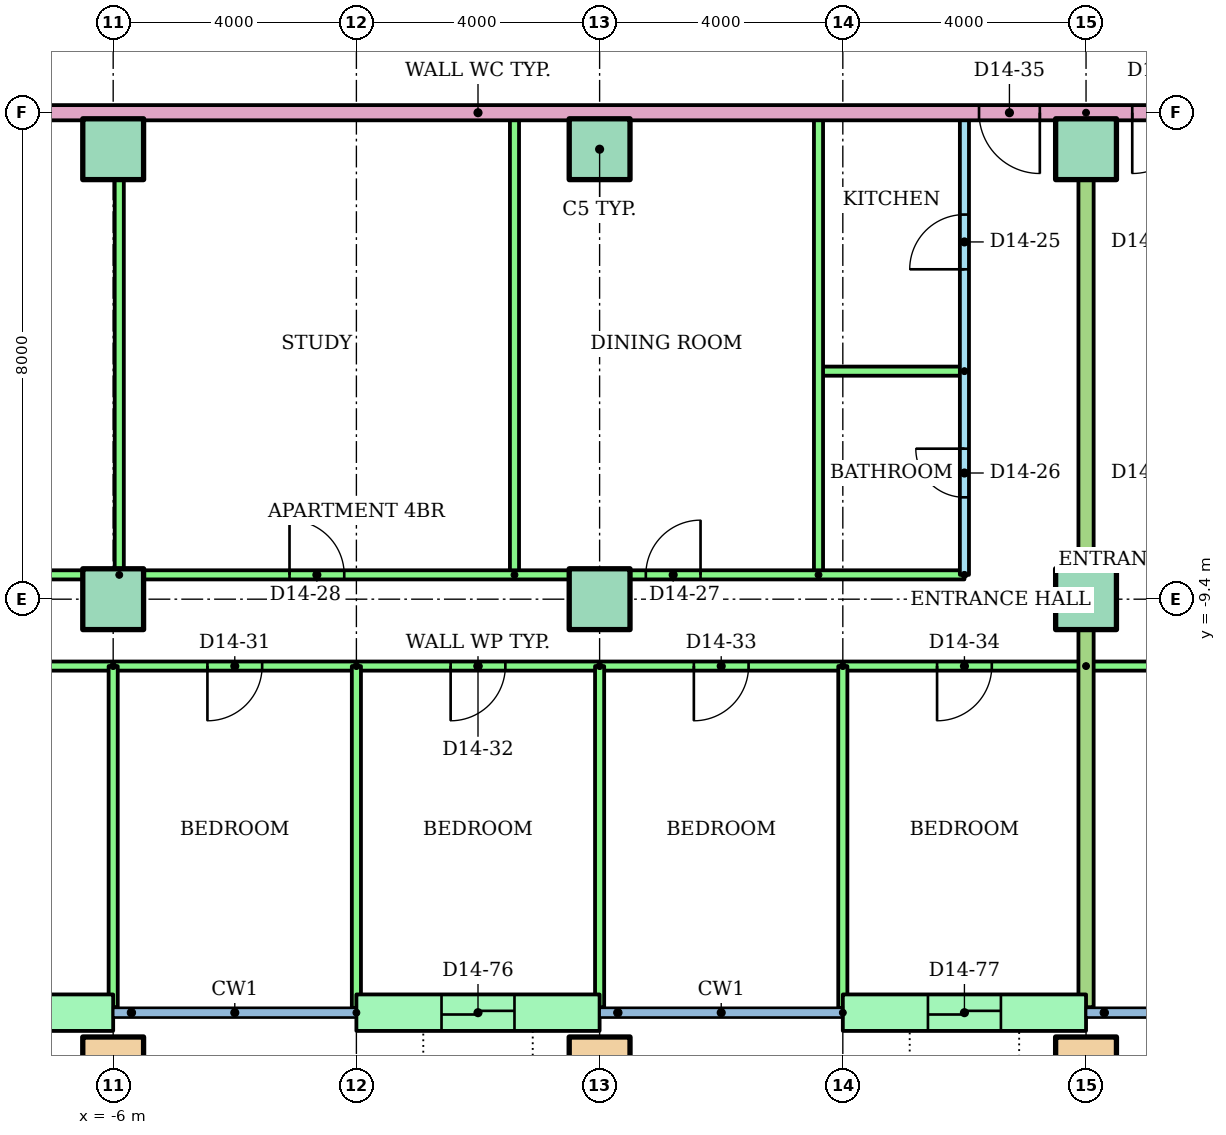
"""IFC4 building model, lengths in metres.
Left out: names, types, materials, properties, quantities, classifications, styles, units other than length and angle.
Written with IfcOpenShell. Run it as: python <this file> out.ifc"""

import sys

from ifc_helpers import new_model, si_unit, direction, frame, frame_2d, origin, origin_2d, place, context, subcontext, project, spatial, rectangle, hollow_rectangle, extrude, element, fill, save


model = new_model("IFC4")
c1 = context("Model", 3, precision=1e-05, world=origin(), true_north=direction((0.0, 1.0)))
c2 = subcontext(c1, "Body", "Model", "MODEL_VIEW")
j1 = project(units=[si_unit("LENGTHUNIT", "METRE"), si_unit("PLANEANGLEUNIT", "RADIAN")], contexts=[c1])
p1 = place(None, origin())
s1 = spatial("IfcSite", under=j1, at=p1, CompositionType="ELEMENT")
p2 = place(p1, origin())
s2 = spatial("IfcBuilding", under=s1, at=p2, CompositionType="ELEMENT")
p3 = place(p2, frame((0.0, 0.0, 54.4)))
s3 = spatial("IfcBuildingStorey", under=s2, at=p3, CompositionType="ELEMENT", Elevation=54.4)
for number, where in (
    (1, (-6.0, -17.1, 0.0)),
    (2, (2.0, -17.1, 0.0)),
    (3, (10.0, -17.1, 0.0)),
):
    element("IfcColumn", number, at=place(p3, frame(where)), inside=s3, PredefinedType="COLUMN", context=c2, shape_type="SweptSolid", body=[
        extrude(hollow_rectangle(XDim=1.0, YDim=1.0, WallThickness=0.05, at=origin_2d()), origin(), (0.0, 0.0, 1.0), 3.2),
    ])
for number, where in (
    (4, (-6.0, -9.4, 0.0)),
    (5, (2.0, -9.4, 0.0)),
    (6, (10.0, -9.4, 0.0)),
    (7, (-6.0, -2.0, 0.0)),
    (8, (2.0, -2.0, 0.0)),
    (9, (10.0, -2.0, 0.0)),
):
    element("IfcColumn", number, at=place(p3, frame(where)), inside=s3, PredefinedType="COLUMN", context=c2, shape_type="SweptSolid", body=[
        extrude(rectangle(XDim=1.0, YDim=1.0, at=origin_2d()), origin(), (0.0, 0.0, 1.0), 3.2),
    ])
p4 = place(p3, frame((-10.0, -16.2, 0.0)))
e10 = element("IfcWall", 10, at=p4, inside=s3, PredefinedType="STANDARD", context=c2, shape_type="SweptSolid", body=[
    extrude(rectangle(XDim=4.0, YDim=0.6, at=frame_2d((2.0, 0.0))), origin(), (0.0, 0.0, 1.0), 2.92),
])
p5 = place(p4, frame((1.4, 0.0, 0.0)))
e11 = element("IfcOpeningElement", 11, at=p5, cuts=e10, PredefinedType="OPENING", context=c2, shape_type="SweptSolid", body=[
    extrude(rectangle(XDim=1.2, YDim=2.1, at=frame_2d((0.6, 1.05))), frame((0.0, 0.31, 0.0), z_axis=(0.0, -1.0, 0.0), x_axis=(1.0, 0.0, 0.0)), (0.0, 0.0, 1.0), 0.62),
])
p6 = place(p3, frame((-2.0, -16.2, 0.0)))
e12 = element("IfcWall", 12, at=p6, inside=s3, PredefinedType="STANDARD", context=c2, shape_type="SweptSolid", body=[
    extrude(rectangle(XDim=4.0, YDim=0.6, at=frame_2d((2.0, 0.0))), origin(), (0.0, 0.0, 1.0), 2.92),
])
p7 = place(p6, frame((1.4, 0.0, 0.0)))
e13 = element("IfcOpeningElement", 13, at=p7, cuts=e12, PredefinedType="OPENING", context=c2, shape_type="SweptSolid", body=[
    extrude(rectangle(XDim=1.2, YDim=2.1, at=frame_2d((0.6, 1.05))), frame((0.0, 0.31, 0.0), z_axis=(0.0, -1.0, 0.0), x_axis=(1.0, 0.0, 0.0)), (0.0, 0.0, 1.0), 0.62),
])
p8 = place(p3, frame((6.0, -16.2, 0.0)))
e14 = element("IfcWall", 14, at=p8, inside=s3, PredefinedType="STANDARD", context=c2, shape_type="SweptSolid", body=[
    extrude(rectangle(XDim=4.0, YDim=0.6, at=frame_2d((2.0, 0.0))), origin(), (0.0, 0.0, 1.0), 2.92),
])
p9 = place(p8, frame((1.4, 0.0, 0.0)))
e15 = element("IfcOpeningElement", 15, at=p9, cuts=e14, PredefinedType="OPENING", context=c2, shape_type="SweptSolid", body=[
    extrude(rectangle(XDim=1.2, YDim=2.1, at=frame_2d((0.6, 1.05))), frame((0.0, 0.31, 0.0), z_axis=(0.0, -1.0, 0.0), x_axis=(1.0, 0.0, 0.0)), (0.0, 0.0, 1.0), 0.62),
])
p10 = place(p3, frame((8.0, -9.0, 0.0), z_axis=(0.0, 0.0, 1.0), x_axis=(0.0, 1.0, 0.0)))
e16 = element("IfcWall", 16, at=p10, inside=s3, PredefinedType="PARTITIONING", context=c2, shape_type="SweptSolid", body=[
    extrude(rectangle(XDim=7.6, YDim=0.15, at=frame_2d((3.8, 0.0))), origin(), (0.0, 0.0, 1.0), 2.4),
])
p11 = place(p10, frame((5.025, 0.0, 0.0)))
e17 = element("IfcOpeningElement", 17, at=p11, cuts=e16, PredefinedType="OPENING", context=c2, shape_type="SweptSolid", body=[
    extrude(rectangle(XDim=0.9, YDim=2.1, at=frame_2d((0.45, 1.05))), frame((0.0, 0.085, 0.0), z_axis=(0.0, -1.0, 0.0), x_axis=(1.0, 0.0, 0.0)), (0.0, 0.0, 1.0), 0.17),
])
p12 = place(p10, frame((1.275, 0.0, 0.0)))
e18 = element("IfcOpeningElement", 18, at=p12, cuts=e16, PredefinedType="OPENING", context=c2, shape_type="SweptSolid", body=[
    extrude(rectangle(XDim=0.8, YDim=2.1, at=frame_2d((0.4, 1.05))), frame((0.0, 0.085, 0.0), z_axis=(0.0, -1.0, 0.0), x_axis=(1.0, 0.0, 0.0)), (0.0, 0.0, 1.0), 0.17),
])
p13 = place(p3, frame((8.0, -5.65, 0.0), z_axis=(0.0, 0.0, 1.0), x_axis=(-1.0, 0.0, 0.0)))
e19 = element("IfcWall", 19, at=p13, inside=s3, PredefinedType="PARTITIONING", context=c2, shape_type="SweptSolid", body=[
    extrude(rectangle(XDim=2.4, YDim=0.15, at=frame_2d((1.2, 0.0))), origin(), (0.0, 0.0, 1.0), 2.4),
])
for number, where, z_axis, x_axis in (
    (20, (5.6, -9.0, 0.0), (0.0, 0.0, 1.0), (0.0, 1.0, 0.0)),
    (21, (0.6, -9.0, 0.0), (0.0, 0.0, 1.0), (0.0, 1.0, 0.0)),
    (22, (-5.9, -9.0, 0.0), (0.0, 0.0, 1.0), (0.0, 1.0, 0.0)),
):
    element("IfcWall", number, at=place(p3, frame(where, z_axis=z_axis, x_axis=x_axis)), inside=s3, PredefinedType="PARTITIONING", context=c2, shape_type="SweptSolid", body=[
        extrude(rectangle(XDim=7.6, YDim=0.15, at=frame_2d((3.8, 0.0))), origin(), (0.0, 0.0, 1.0), 2.4),
    ])
p14 = place(p3, frame((-14.0, -9.0, 0.0)))
e23 = element("IfcWall", 23, at=p14, inside=s3, PredefinedType="PARTITIONING", context=c2, shape_type="SweptSolid", body=[
    extrude(rectangle(XDim=22.0, YDim=0.15, at=frame_2d((11.0, 0.0))), origin(), (0.0, 0.0, 1.0), 2.4),
])
p15 = place(p14, frame((16.76, 0.0, 0.0)))
e24 = element("IfcOpeningElement", 24, at=p15, cuts=e23, PredefinedType="OPENING", context=c2, shape_type="SweptSolid", body=[
    extrude(rectangle(XDim=0.9, YDim=2.1, at=frame_2d((0.45, 1.05))), frame((0.0, 0.085, 0.0), z_axis=(0.0, -1.0, 0.0), x_axis=(1.0, 0.0, 0.0)), (0.0, 0.0, 1.0), 0.17),
])
p16 = place(p14, frame((10.9, 0.0, 0.0)))
e25 = element("IfcOpeningElement", 25, at=p16, cuts=e23, PredefinedType="OPENING", context=c2, shape_type="SweptSolid", body=[
    extrude(rectangle(XDim=0.9, YDim=2.1, at=frame_2d((0.45, 1.05))), frame((0.0, 0.085, 0.0), z_axis=(0.0, -1.0, 0.0), x_axis=(1.0, 0.0, 0.0)), (0.0, 0.0, 1.0), 0.17),
])
p17 = place(p14, frame((3.6, 0.0, 0.0)))
e26 = element("IfcOpeningElement", 26, at=p17, cuts=e23, PredefinedType="OPENING", context=c2, shape_type="SweptSolid", body=[
    extrude(rectangle(XDim=0.9, YDim=2.1, at=frame_2d((0.45, 1.05))), frame((0.0, 0.085, 0.0), z_axis=(0.0, -1.0, 0.0), x_axis=(1.0, 0.0, 0.0)), (0.0, 0.0, 1.0), 0.17),
])
p18 = place(p3, frame((10.0, -10.5, 0.0), z_axis=(0.0, 0.0, 1.0), x_axis=(-1.0, 0.0, 0.0)))
e27 = element("IfcWall", 27, at=p18, inside=s3, PredefinedType="PARTITIONING", context=c2, shape_type="SweptSolid", body=[
    extrude(rectangle(XDim=24.0, YDim=0.15, at=frame_2d((12.0, 0.0))), origin(), (0.0, 0.0, 1.0), 2.4),
])
p19 = place(p18, frame((19.5, 0.0, 0.0)))
e28 = element("IfcOpeningElement", 28, at=p19, cuts=e27, PredefinedType="OPENING", context=c2, shape_type="SweptSolid", body=[
    extrude(rectangle(XDim=1.0, YDim=2.1, at=frame_2d((0.5, 1.05))), frame((0.0, 0.085, 0.0), z_axis=(0.0, -1.0, 0.0), x_axis=(1.0, 0.0, 0.0)), (0.0, 0.0, 1.0), 0.17),
])
p20 = place(p18, frame((13.55, 0.0, 0.0)))
e29 = element("IfcOpeningElement", 29, at=p20, cuts=e27, PredefinedType="OPENING", context=c2, shape_type="SweptSolid", body=[
    extrude(rectangle(XDim=0.9, YDim=2.1, at=frame_2d((0.45, 1.05))), frame((0.0, 0.085, 0.0), z_axis=(0.0, -1.0, 0.0), x_axis=(1.0, 0.0, 0.0)), (0.0, 0.0, 1.0), 0.17),
])
p21 = place(p18, frame((9.55, 0.0, 0.0)))
e30 = element("IfcOpeningElement", 30, at=p21, cuts=e27, PredefinedType="OPENING", context=c2, shape_type="SweptSolid", body=[
    extrude(rectangle(XDim=0.9, YDim=2.1, at=frame_2d((0.45, 1.05))), frame((0.0, 0.085, 0.0), z_axis=(0.0, -1.0, 0.0), x_axis=(1.0, 0.0, 0.0)), (0.0, 0.0, 1.0), 0.17),
])
p22 = place(p18, frame((5.55, 0.0, 0.0)))
e31 = element("IfcOpeningElement", 31, at=p22, cuts=e27, PredefinedType="OPENING", context=c2, shape_type="SweptSolid", body=[
    extrude(rectangle(XDim=0.9, YDim=2.1, at=frame_2d((0.45, 1.05))), frame((0.0, 0.085, 0.0), z_axis=(0.0, -1.0, 0.0), x_axis=(1.0, 0.0, 0.0)), (0.0, 0.0, 1.0), 0.17),
])
p23 = place(p18, frame((1.55, 0.0, 0.0)))
e32 = element("IfcOpeningElement", 32, at=p23, cuts=e27, PredefinedType="OPENING", context=c2, shape_type="SweptSolid", body=[
    extrude(rectangle(XDim=0.9, YDim=2.1, at=frame_2d((0.45, 1.05))), frame((0.0, 0.085, 0.0), z_axis=(0.0, -1.0, 0.0), x_axis=(1.0, 0.0, 0.0)), (0.0, 0.0, 1.0), 0.17),
])
p24 = place(p3, frame((-6.0, -10.5, 0.0), z_axis=(0.0, 0.0, 1.0), x_axis=(0.0, -1.0, 0.0)))
e33 = element("IfcWall", 33, at=p24, inside=s3, PredefinedType="PARTITIONING", context=c2, shape_type="SweptSolid", body=[
    extrude(rectangle(XDim=5.61, YDim=0.15, at=frame_2d((2.805, 0.0))), origin(), (0.0, 0.0, 1.0), 2.4),
])
p25 = place(p3, frame((-2.0, -10.5, 0.0), z_axis=(0.0, 0.0, 1.0), x_axis=(0.0, -1.0, 0.0)))
e34 = element("IfcWall", 34, at=p25, inside=s3, PredefinedType="PARTITIONING", context=c2, shape_type="SweptSolid", body=[
    extrude(rectangle(XDim=5.621, YDim=0.15, at=frame_2d((2.811, 0.0))), origin(), (0.0, 0.0, 1.0), 2.4),
])
p26 = place(p3, frame((2.0, -10.5, 0.0), z_axis=(0.0, 0.0, 1.0), x_axis=(0.0, -1.0, 0.0)))
e35 = element("IfcWall", 35, at=p26, inside=s3, PredefinedType="PARTITIONING", context=c2, shape_type="SweptSolid", body=[
    extrude(rectangle(XDim=5.61, YDim=0.15, at=frame_2d((2.805, 0.0))), origin(), (0.0, 0.0, 1.0), 2.4),
])
p27 = place(p3, frame((6.0, -10.5, 0.0), z_axis=(0.0, 0.0, 1.0), x_axis=(0.0, -1.0, 0.0)))
e36 = element("IfcWall", 36, at=p27, inside=s3, PredefinedType="PARTITIONING", context=c2, shape_type="SweptSolid", body=[
    extrude(rectangle(XDim=5.621, YDim=0.15, at=frame_2d((2.811, 0.0))), origin(), (0.0, 0.0, 1.0), 2.4),
])
p28 = place(p3, frame((36.52, -10.5, 0.0), z_axis=(0.0, 0.0, 1.0), x_axis=(-1.0, 0.0, 0.0)))
e37 = element("IfcWall", 37, at=p28, inside=s3, PredefinedType="PARTITIONING", context=c2, shape_type="SweptSolid", body=[
    extrude(rectangle(XDim=26.52, YDim=0.15, at=frame_2d((13.26, 0.0))), origin(), (0.0, 0.0, 1.0), 2.4),
])
p29 = place(p28, frame((22.02, 0.0, 0.0)))
e38 = element("IfcOpeningElement", 38, at=p29, cuts=e37, PredefinedType="OPENING", context=c2, shape_type="SweptSolid", body=[
    extrude(rectangle(XDim=1.0, YDim=2.1, at=frame_2d((0.5, 1.05))), frame((0.0, 0.085, 0.0), z_axis=(0.0, -1.0, 0.0), x_axis=(1.0, 0.0, 0.0)), (0.0, 0.0, 1.0), 0.17),
])
p30 = place(p28, frame((16.07, 0.0, 0.0)))
e39 = element("IfcOpeningElement", 39, at=p30, cuts=e37, PredefinedType="OPENING", context=c2, shape_type="SweptSolid", body=[
    extrude(rectangle(XDim=0.9, YDim=2.1, at=frame_2d((0.45, 1.05))), frame((0.0, 0.085, 0.0), z_axis=(0.0, -1.0, 0.0), x_axis=(1.0, 0.0, 0.0)), (0.0, 0.0, 1.0), 0.17),
])
p31 = place(p28, frame((12.07, 0.0, 0.0)))
e40 = element("IfcOpeningElement", 40, at=p31, cuts=e37, PredefinedType="OPENING", context=c2, shape_type="SweptSolid", body=[
    extrude(rectangle(XDim=0.9, YDim=2.1, at=frame_2d((0.45, 1.05))), frame((0.0, 0.085, 0.0), z_axis=(0.0, -1.0, 0.0), x_axis=(1.0, 0.0, 0.0)), (0.0, 0.0, 1.0), 0.17),
])
p32 = place(p28, frame((6.87, 0.0, 0.0)))
e41 = element("IfcOpeningElement", 41, at=p32, cuts=e37, PredefinedType="OPENING", context=c2, shape_type="SweptSolid", body=[
    extrude(rectangle(XDim=0.9, YDim=2.1, at=frame_2d((0.45, 1.05))), frame((0.0, 0.085, 0.0), z_axis=(0.0, -1.0, 0.0), x_axis=(1.0, 0.0, 0.0)), (0.0, 0.0, 1.0), 0.17),
])
p33 = place(p28, frame((0.86, 0.0, 0.0)))
e42 = element("IfcOpeningElement", 42, at=p33, cuts=e37, PredefinedType="OPENING", context=c2, shape_type="SweptSolid", body=[
    extrude(rectangle(XDim=0.9, YDim=2.1, at=frame_2d((0.45, 1.05))), frame((0.0, 0.085, 0.0), z_axis=(0.0, -1.0, 0.0), x_axis=(1.0, 0.0, 0.0)), (0.0, 0.0, 1.0), 0.17),
])
p34 = place(p3, frame((10.0, -1.4, 0.0), z_axis=(0.0, 0.0, 1.0), x_axis=(0.0, -1.0, 0.0)))
e43 = element("IfcWall", 43, at=p34, inside=s3, PredefinedType="PARTITIONING", context=c2, shape_type="SweptSolid", body=[
    extrude(rectangle(XDim=14.71, YDim=0.25, at=frame_2d((7.355, 0.0))), origin(), (0.0, 0.0, 1.0), 2.4),
])
p35 = place(p3, frame((14.0, -1.4, 0.0), z_axis=(0.0, 0.0, 1.0), x_axis=(-1.0, 0.0, 0.0)))
e44 = element("IfcWall", 44, at=p35, inside=s3, PredefinedType="PARTITIONING", context=c2, shape_type="SweptSolid", body=[
    extrude(rectangle(XDim=28.0, YDim=0.25, at=frame_2d((14.0, 0.0))), origin(), (0.0, 0.0, 1.0), 2.4),
])
p36 = place(p35, frame((4.76, 0.0, 0.0)))
e45 = element("IfcOpeningElement", 45, at=p36, cuts=e44, PredefinedType="OPENING", context=c2, shape_type="SweptSolid", body=[
    extrude(rectangle(XDim=1.0, YDim=2.1, at=frame_2d((0.5, 1.05))), frame((0.0, 0.135, 0.0), z_axis=(0.0, -1.0, 0.0), x_axis=(1.0, 0.0, 0.0)), (0.0, 0.0, 1.0), 0.27),
])
p37 = place(p35, frame((2.24, 0.0, 0.0)))
e46 = element("IfcOpeningElement", 46, at=p37, cuts=e44, PredefinedType="OPENING", context=c2, shape_type="SweptSolid", body=[
    extrude(rectangle(XDim=1.0, YDim=2.1, at=frame_2d((0.5, 1.05))), frame((0.0, 0.135, 0.0), z_axis=(0.0, -1.0, 0.0), x_axis=(1.0, 0.0, 0.0)), (0.0, 0.0, 1.0), 0.27),
])
p38 = place(p11, origin())
e47 = element("IfcDoor", 47, at=p38, inside=s3, OperationType="SINGLE_SWING_LEFT", PredefinedType="DOOR", context=c2, shape_type="SweptSolid", body=[
    extrude(rectangle(XDim=0.9, YDim=2.1, at=frame_2d((0.45, 1.05))), frame((0.0, 0.025, 0.0), z_axis=(0.0, -1.0, 0.0), x_axis=(1.0, 0.0, 0.0)), (0.0, 0.0, 1.0), 0.05),
])
fill(e17, e47)
p39 = place(p12, origin())
e48 = element("IfcDoor", 48, at=p39, inside=s3, OperationType="SINGLE_SWING_RIGHT", PredefinedType="DOOR", context=c2, shape_type="SweptSolid", body=[
    extrude(rectangle(XDim=0.8, YDim=2.1, at=frame_2d((0.4, 1.05))), frame((0.0, 0.025, 0.0), z_axis=(0.0, -1.0, 0.0), x_axis=(1.0, 0.0, 0.0)), (0.0, 0.0, 1.0), 0.05),
])
fill(e18, e48)
p40 = place(p15, origin())
e49 = element("IfcDoor", 49, at=p40, inside=s3, OperationType="SINGLE_SWING_RIGHT", PredefinedType="DOOR", context=c2, shape_type="SweptSolid", body=[
    extrude(rectangle(XDim=0.9, YDim=2.1, at=frame_2d((0.45, 1.05))), frame((0.0, 0.025, 0.0), z_axis=(0.0, -1.0, 0.0), x_axis=(1.0, 0.0, 0.0)), (0.0, 0.0, 1.0), 0.05),
])
fill(e24, e49)
p41 = place(p16, origin())
e50 = element("IfcDoor", 50, at=p41, inside=s3, OperationType="SINGLE_SWING_LEFT", PredefinedType="DOOR", context=c2, shape_type="SweptSolid", body=[
    extrude(rectangle(XDim=0.9, YDim=2.1, at=frame_2d((0.45, 1.05))), frame((0.0, 0.025, 0.0), z_axis=(0.0, -1.0, 0.0), x_axis=(1.0, 0.0, 0.0)), (0.0, 0.0, 1.0), 0.05),
])
fill(e25, e50)
p42 = place(p20, origin())
e51 = element("IfcDoor", 51, at=p42, inside=s3, OperationType="SINGLE_SWING_RIGHT", PredefinedType="DOOR", context=c2, shape_type="SweptSolid", body=[
    extrude(rectangle(XDim=0.9, YDim=2.1, at=frame_2d((0.45, 1.05))), frame((0.0, 0.025, 0.0), z_axis=(0.0, -1.0, 0.0), x_axis=(1.0, 0.0, 0.0)), (0.0, 0.0, 1.0), 0.05),
])
fill(e29, e51)
p43 = place(p21, origin())
e52 = element("IfcDoor", 52, at=p43, inside=s3, OperationType="SINGLE_SWING_RIGHT", PredefinedType="DOOR", context=c2, shape_type="SweptSolid", body=[
    extrude(rectangle(XDim=0.9, YDim=2.1, at=frame_2d((0.45, 1.05))), frame((0.0, 0.025, 0.0), z_axis=(0.0, -1.0, 0.0), x_axis=(1.0, 0.0, 0.0)), (0.0, 0.0, 1.0), 0.05),
])
fill(e30, e52)
p44 = place(p22, origin())
e53 = element("IfcDoor", 53, at=p44, inside=s3, OperationType="SINGLE_SWING_RIGHT", PredefinedType="DOOR", context=c2, shape_type="SweptSolid", body=[
    extrude(rectangle(XDim=0.9, YDim=2.1, at=frame_2d((0.45, 1.05))), frame((0.0, 0.025, 0.0), z_axis=(0.0, -1.0, 0.0), x_axis=(1.0, 0.0, 0.0)), (0.0, 0.0, 1.0), 0.05),
])
fill(e31, e53)
p45 = place(p23, origin())
e54 = element("IfcDoor", 54, at=p45, inside=s3, OperationType="SINGLE_SWING_RIGHT", PredefinedType="DOOR", context=c2, shape_type="SweptSolid", body=[
    extrude(rectangle(XDim=0.9, YDim=2.1, at=frame_2d((0.45, 1.05))), frame((0.0, 0.025, 0.0), z_axis=(0.0, -1.0, 0.0), x_axis=(1.0, 0.0, 0.0)), (0.0, 0.0, 1.0), 0.05),
])
fill(e32, e54)
p46 = place(p36, origin())
e55 = element("IfcDoor", 55, at=p46, inside=s3, OperationType="SINGLE_SWING_LEFT", PredefinedType="DOOR", context=c2, shape_type="SweptSolid", body=[
    extrude(rectangle(XDim=1.0, YDim=2.1, at=frame_2d((0.5, 1.05))), frame((0.0, 0.025, 0.0), z_axis=(0.0, -1.0, 0.0), x_axis=(1.0, 0.0, 0.0)), (0.0, 0.0, 1.0), 0.05),
])
fill(e45, e55)
p47 = place(p37, origin())
e56 = element("IfcDoor", 56, at=p47, inside=s3, OperationType="SINGLE_SWING_RIGHT", PredefinedType="DOOR", context=c2, shape_type="SweptSolid", body=[
    extrude(rectangle(XDim=1.0, YDim=2.1, at=frame_2d((0.5, 1.05))), frame((0.0, 0.025, 0.0), z_axis=(0.0, -1.0, 0.0), x_axis=(1.0, 0.0, 0.0)), (0.0, 0.0, 1.0), 0.05),
])
fill(e46, e56)
p48 = place(p7, origin())
e57 = element("IfcDoor", 57, at=p48, inside=s3, OperationType="SLIDING_TO_LEFT", PredefinedType="DOOR", context=c2, shape_type="SweptSolid", body=[
    extrude(rectangle(XDim=1.2, YDim=2.1, at=frame_2d((0.6, 1.05))), frame((0.0, 0.025, 0.0), z_axis=(0.0, -1.0, 0.0), x_axis=(1.0, 0.0, 0.0)), (0.0, 0.0, 1.0), 0.05),
])
fill(e13, e57)
p49 = place(p9, origin())
e58 = element("IfcDoor", 58, at=p49, inside=s3, OperationType="SLIDING_TO_LEFT", PredefinedType="DOOR", context=c2, shape_type="SweptSolid", body=[
    extrude(rectangle(XDim=1.2, YDim=2.1, at=frame_2d((0.6, 1.05))), frame((0.0, 0.025, 0.0), z_axis=(0.0, -1.0, 0.0), x_axis=(1.0, 0.0, 0.0)), (0.0, 0.0, 1.0), 0.05),
])
fill(e15, e58)
save(model, sys.argv[1])
